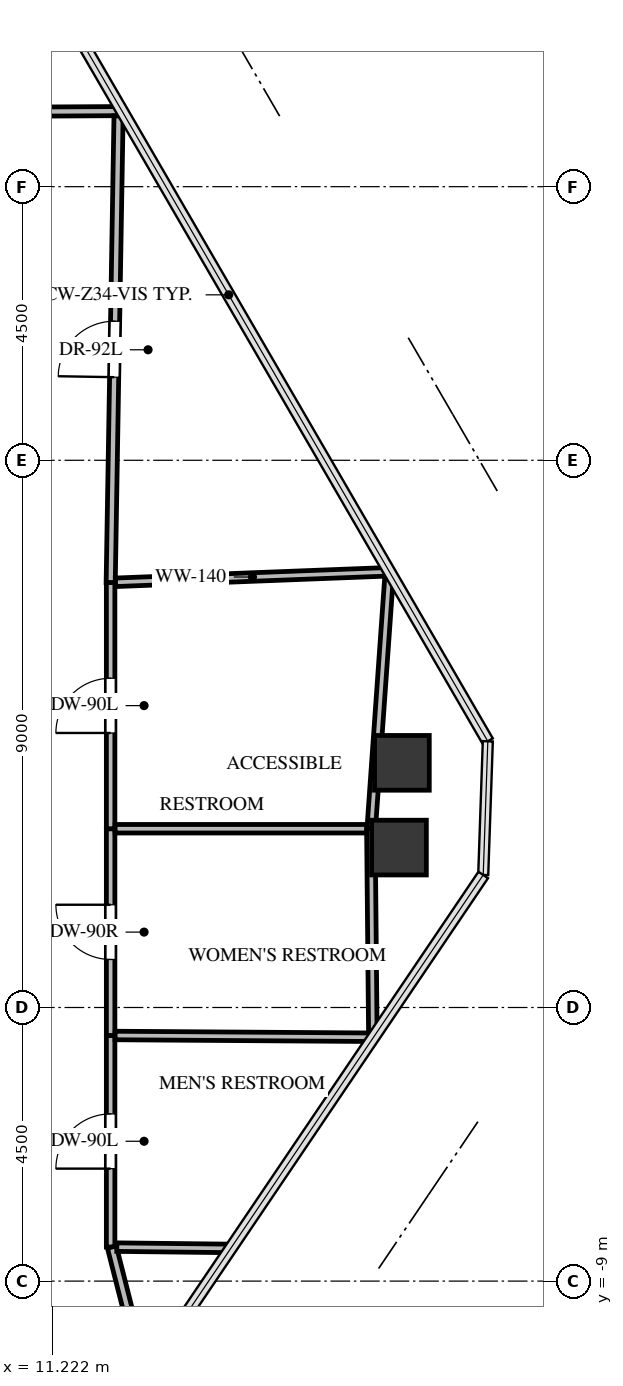
"""IFC4 building model, lengths in metres.
Left out: names, types, materials, properties, quantities, classifications, styles, units other than length and angle.
Written with IfcOpenShell. Run it as: python <this file> out.ifc"""

import sys

from ifc_helpers import new_model, si_unit, direction, frame, frame_2d, origin, origin_2d, place, context, subcontext, project, spatial, rectangle, extrude, source, transform, mapped, element, fill, save


model = new_model("IFC4")
c1 = context("Model", 3, precision=1e-05, world=origin(), true_north=direction((0.0, 1.0)))
c2 = subcontext(c1, "Body", "Model", "MODEL_VIEW")
j1 = project(units=[si_unit("LENGTHUNIT", "METRE"), si_unit("PLANEANGLEUNIT", "RADIAN")], contexts=[c1])
p1 = place(None, origin())
s1 = spatial("IfcSite", under=j1, at=p1, CompositionType="ELEMENT")
p2 = place(p1, origin())
s2 = spatial("IfcBuilding", under=s1, at=p2, CompositionType="ELEMENT")
p3 = place(p2, frame((0.0, 0.0, 218.3)))
s3 = spatial("IfcBuildingStorey", under=s2, at=p3, CompositionType="ELEMENT", Elevation=218.3)
m1 = source(origin(), c2, "Body", "SweptSolid", [
    extrude(rectangle(XDim=0.9, YDim=0.9, at=origin_2d()), origin(), (0.0, 0.0, 1.0), 3.3),
])
for number, where, z_axis, x_axis in (
    (1, (16.97, -0.476, -0.24), (0.0, 0.0, 1.0), (1.0, 0.0, 0.0)),
    (2, (16.922, -1.87, -0.24), (0.0, 0.0, 1.0), (1.0, 0.0, 0.0)),
):
    element("IfcColumn", number, at=place(p3, frame(where, z_axis=z_axis, x_axis=x_axis)), inside=s3, PredefinedType="COLUMN", context=c2, shape_type="MappedRepresentation", body=[
        mapped(m1, transform((0.0, 0.0, 0.0), x_axis=(1.0, 0.0, 0.0), y_axis=(0.0, 1.0, 0.0), z_axis=(0.0, 0.0, 1.0), scale=1.0)),
    ])
p4 = place(p3, frame((12.18, -8.44, 0.0), z_axis=(0.0, 0.0, 1.0), x_axis=(0.0, 1.0, 0.0)))
e3 = element("IfcWall", 3, at=p4, inside=s3, PredefinedType="PARTITIONING", context=c2, shape_type="SweptSolid", body=[
    extrude(rectangle(XDim=3.48, YDim=0.14, at=frame_2d((1.74, 0.0))), origin(), (0.0, 0.0, 1.0), 2.399),
])
p5 = place(p4, frame((1.29, 0.0, 0.0)))
e4 = element("IfcOpeningElement", 4, at=p5, cuts=e3, PredefinedType="OPENING", context=c2, shape_type="SweptSolid", body=[
    extrude(rectangle(XDim=0.9, YDim=2.05, at=frame_2d((0.45, 1.025))), frame((0.0, 0.08, 0.0), z_axis=(0.0, -1.0, 0.0), x_axis=(1.0, 0.0, 0.0)), (0.0, 0.0, 1.0), 0.16),
])
p6 = place(p3, frame((12.18, -4.96, 0.0), z_axis=(0.0, 0.0, 1.0), x_axis=(0.0, 1.0, 0.0)))
e5 = element("IfcWall", 5, at=p6, inside=s3, PredefinedType="PARTITIONING", context=c2, shape_type="SweptSolid", body=[
    extrude(rectangle(XDim=3.4, YDim=0.14, at=frame_2d((1.7, 0.0))), origin(), (0.0, 0.0, 1.0), 3.045),
])
p7 = place(p6, frame((1.25, 0.0, 0.0)))
e6 = element("IfcOpeningElement", 6, at=p7, cuts=e5, PredefinedType="OPENING", context=c2, shape_type="SweptSolid", body=[
    extrude(rectangle(XDim=0.9, YDim=2.05, at=frame_2d((0.45, 1.025))), frame((0.0, 0.08, 0.0), z_axis=(0.0, -1.0, 0.0), x_axis=(1.0, 0.0, 0.0)), (0.0, 0.0, 1.0), 0.16),
])
p8 = place(p3, frame((12.18, -1.56, 0.0), z_axis=(0.0, 0.0, 1.0), x_axis=(0.0, 1.0, 0.0)))
e7 = element("IfcWall", 7, at=p8, inside=s3, PredefinedType="PARTITIONING", context=c2, shape_type="SweptSolid", body=[
    extrude(rectangle(XDim=4.05, YDim=0.14, at=frame_2d((2.025, 0.0))), origin(), (0.0, 0.0, 1.0), 2.301),
])
p9 = place(p8, frame((1.575, 0.0, 0.0)))
e8 = element("IfcOpeningElement", 8, at=p9, cuts=e7, PredefinedType="OPENING", context=c2, shape_type="SweptSolid", body=[
    extrude(rectangle(XDim=0.9, YDim=2.05, at=frame_2d((0.45, 1.025))), frame((0.0, 0.08, 0.0), z_axis=(0.0, -1.0, 0.0), x_axis=(1.0, 0.0, 0.0)), (0.0, 0.0, 1.0), 0.16),
])
p10 = place(p3, frame((12.368, 10.243, 0.0), z_axis=(0.0, 0.0, 1.0), x_axis=(-0.999984623931, -0.005545439622, 0.0)))
e9 = element("IfcWall", 9, at=p10, inside=s3, PredefinedType="PARTITIONING", context=c2, shape_type="SweptSolid", body=[
    extrude(rectangle(XDim=11.359, YDim=0.15, at=frame_2d((5.679, 0.0))), origin(), (0.0, 0.0, 1.0), 2.301),
])
p11 = place(p10, frame((5.219, 0.0, 0.0)))
e10 = element("IfcOpeningElement", 10, at=p11, cuts=e9, PredefinedType="OPENING", context=c2, shape_type="SweptSolid", body=[
    extrude(rectangle(XDim=0.92, YDim=2.1, at=frame_2d((0.46, 1.05))), frame((0.0, 0.085, 0.0), z_axis=(0.0, -1.0, 0.0), x_axis=(1.0, 0.0, 0.0)), (0.0, 0.0, 1.0), 0.17),
])
p12 = place(p3, frame((12.719, -10.478, 0.0), z_axis=(0.0, 0.0, 1.0), x_axis=(-0.246494896578, 0.96914408937, 0.0)))
e11 = element("IfcWall", 11, at=p12, inside=s3, PredefinedType="PARTITIONING", context=c2, shape_type="SweptSolid", body=[
    extrude(rectangle(XDim=2.103, YDim=0.15, at=frame_2d((1.051, 0.0))), origin(), (0.0, 0.0, 1.0), 2.399),
])
p13 = place(p3, frame((12.181, 2.49, 0.0), z_axis=(0.0, 0.0, 1.0), x_axis=(0.016828134389, 0.999858396921, 0.0)))
e12 = element("IfcWall", 12, at=p13, inside=s3, PredefinedType="PARTITIONING", context=c2, shape_type="SweptSolid", body=[
    extrude(rectangle(XDim=7.675, YDim=0.15, at=frame_2d((3.837, 0.0))), origin(), (0.0, 0.0, 1.0), 2.399),
])
p14 = place(p13, frame((3.377, 0.0, 0.0)))
e13 = element("IfcOpeningElement", 13, at=p14, cuts=e12, PredefinedType="OPENING", context=c2, shape_type="SweptSolid", body=[
    extrude(rectangle(XDim=0.92, YDim=2.1, at=frame_2d((0.46, 1.05))), frame((0.0, 0.085, 0.0), z_axis=(0.0, -1.0, 0.0), x_axis=(1.0, 0.0, 0.0)), (0.0, 0.0, 1.0), 0.17),
])
p15 = place(p3, frame((12.254, -4.96, 0.0), z_axis=(0.0, 0.0, 1.0), x_axis=(0.999976630429, -0.006836563198, 0.0)))
e14 = element("IfcWall", 14, at=p15, inside=s3, PredefinedType="PARTITIONING", context=c2, shape_type="SweptSolid", body=[
    extrude(rectangle(XDim=4.25, YDim=0.14, at=frame_2d((2.125, 0.0))), origin(), (0.0, 0.0, 1.0), 2.399),
])
p16 = place(p3, frame((14.156, -8.462, 0.0), z_axis=(0.0, 0.0, 1.0), x_axis=(-0.999935742613, 0.011336253532, 0.0)))
e15 = element("IfcWall", 15, at=p16, inside=s3, PredefinedType="PARTITIONING", context=c2, shape_type="SweptSolid", body=[
    extrude(rectangle(XDim=1.874, YDim=0.14, at=frame_2d((0.937, 0.0))), origin(), (0.0, 0.0, 1.0), 2.399),
])
p17 = place(p3, frame((12.254, -1.56, 0.0), z_axis=(0.0, 0.0, 1.0), x_axis=(1.0, 0.0, 0.0)))
e16 = element("IfcWall", 16, at=p17, inside=s3, PredefinedType="PARTITIONING", context=c2, shape_type="SweptSolid", body=[
    extrude(rectangle(XDim=4.206, YDim=0.14, at=frame_2d((2.103, 0.0))), origin(), (0.0, 0.0, 1.0), 2.301),
])
p18 = place(p3, frame((16.46, -1.56, 0.0), z_axis=(0.0, 0.0, 1.0), x_axis=(0.009604446748, -0.999953876238, 0.0)))
e17 = element("IfcWall", 17, at=p18, inside=s3, PredefinedType="PARTITIONING", context=c2, shape_type="SweptSolid", body=[
    extrude(rectangle(XDim=3.355, YDim=0.14, at=frame_2d((1.678, 0.0))), origin(), (0.0, 0.0, 1.0), 2.301),
])
p19 = place(p3, frame((12.26, 2.493, 0.0), z_axis=(0.0, 0.0, 1.0), x_axis=(0.999256206289, 0.038562082324, 0.0)))
e18 = element("IfcWall", 18, at=p19, inside=s3, PredefinedType="PARTITIONING", context=c2, shape_type="SweptSolid", body=[
    extrude(rectangle(XDim=4.508, YDim=0.14, at=frame_2d((2.254, 0.0))), origin(), (0.0, 0.0, 1.0), 2.399),
])
p20 = place(p3, frame((16.76, 2.593, 0.0), z_axis=(0.0, 0.0, 1.0), x_axis=(-0.07055102187, -0.997508172053, 0.0)))
e19 = element("IfcWall", 19, at=p20, inside=s3, PredefinedType="PARTITIONING", context=c2, shape_type="SweptSolid", body=[
    extrude(rectangle(XDim=4.163, YDim=0.14, at=frame_2d((2.082, 0.0))), origin(), (0.0, 0.0, 1.0), 2.301),
])
m2 = source(origin(), c2, "Body", "SweptSolid", [
    extrude(rectangle(XDim=0.9, YDim=2.05, at=frame_2d((0.45, 1.025))), frame((0.0, 0.025, 0.0), z_axis=(0.0, -1.0, 0.0), x_axis=(1.0, 0.0, 0.0)), (0.0, 0.0, 1.0), 0.05),
])
p21 = place(p5, origin())
e20 = element("IfcDoor", 20, at=p21, inside=s3, OperationType="SINGLE_SWING_LEFT", PredefinedType="DOOR", context=c2, shape_type="MappedRepresentation", body=[
    mapped(m2, transform((0.0, 0.0, 0.0), x_axis=(1.0, 0.0, 0.0), y_axis=(0.0, 1.0, 0.0), z_axis=(0.0, 0.0, 1.0), scale=1.0)),
])
fill(e4, e20)
m3 = source(origin(), c2, "Body", "SweptSolid", [
    extrude(rectangle(XDim=0.9, YDim=2.05, at=frame_2d((0.45, 1.025))), frame((0.0, 0.025, 0.0), z_axis=(0.0, -1.0, 0.0), x_axis=(1.0, 0.0, 0.0)), (0.0, 0.0, 1.0), 0.05),
])
p22 = place(p7, origin())
e21 = element("IfcDoor", 21, at=p22, inside=s3, OperationType="SINGLE_SWING_RIGHT", PredefinedType="DOOR", context=c2, shape_type="MappedRepresentation", body=[
    mapped(m3, transform((0.0, 0.0, 0.0), x_axis=(1.0, 0.0, 0.0), y_axis=(0.0, 1.0, 0.0), z_axis=(0.0, 0.0, 1.0), scale=1.0)),
])
fill(e6, e21)
p23 = place(p9, origin())
e22 = element("IfcDoor", 22, at=p23, inside=s3, OperationType="SINGLE_SWING_LEFT", PredefinedType="DOOR", context=c2, shape_type="MappedRepresentation", body=[
    mapped(m2, transform((0.0, 0.0, 0.0), x_axis=(1.0, 0.0, 0.0), y_axis=(0.0, 1.0, 0.0), z_axis=(0.0, 0.0, 1.0), scale=1.0)),
])
fill(e8, e22)
m4 = source(origin(), c2, "Body", "SweptSolid", [
    extrude(rectangle(XDim=0.92, YDim=2.1, at=frame_2d((0.46, 1.05))), frame((0.0, 0.025, 0.0), z_axis=(0.0, -1.0, 0.0), x_axis=(1.0, 0.0, 0.0)), (0.0, 0.0, 1.0), 0.05),
])
p24 = place(p14, origin())
e23 = element("IfcDoor", 23, at=p24, inside=s3, OperationType="SINGLE_SWING_LEFT", PredefinedType="DOOR", context=c2, shape_type="MappedRepresentation", body=[
    mapped(m4, transform((0.0, 0.0, 0.0), x_axis=(1.0, 0.0, 0.0), y_axis=(0.0, 1.0, 0.0), z_axis=(0.0, 0.0, 1.0), scale=1.0)),
])
fill(e13, e23)
save(model, sys.argv[1])
